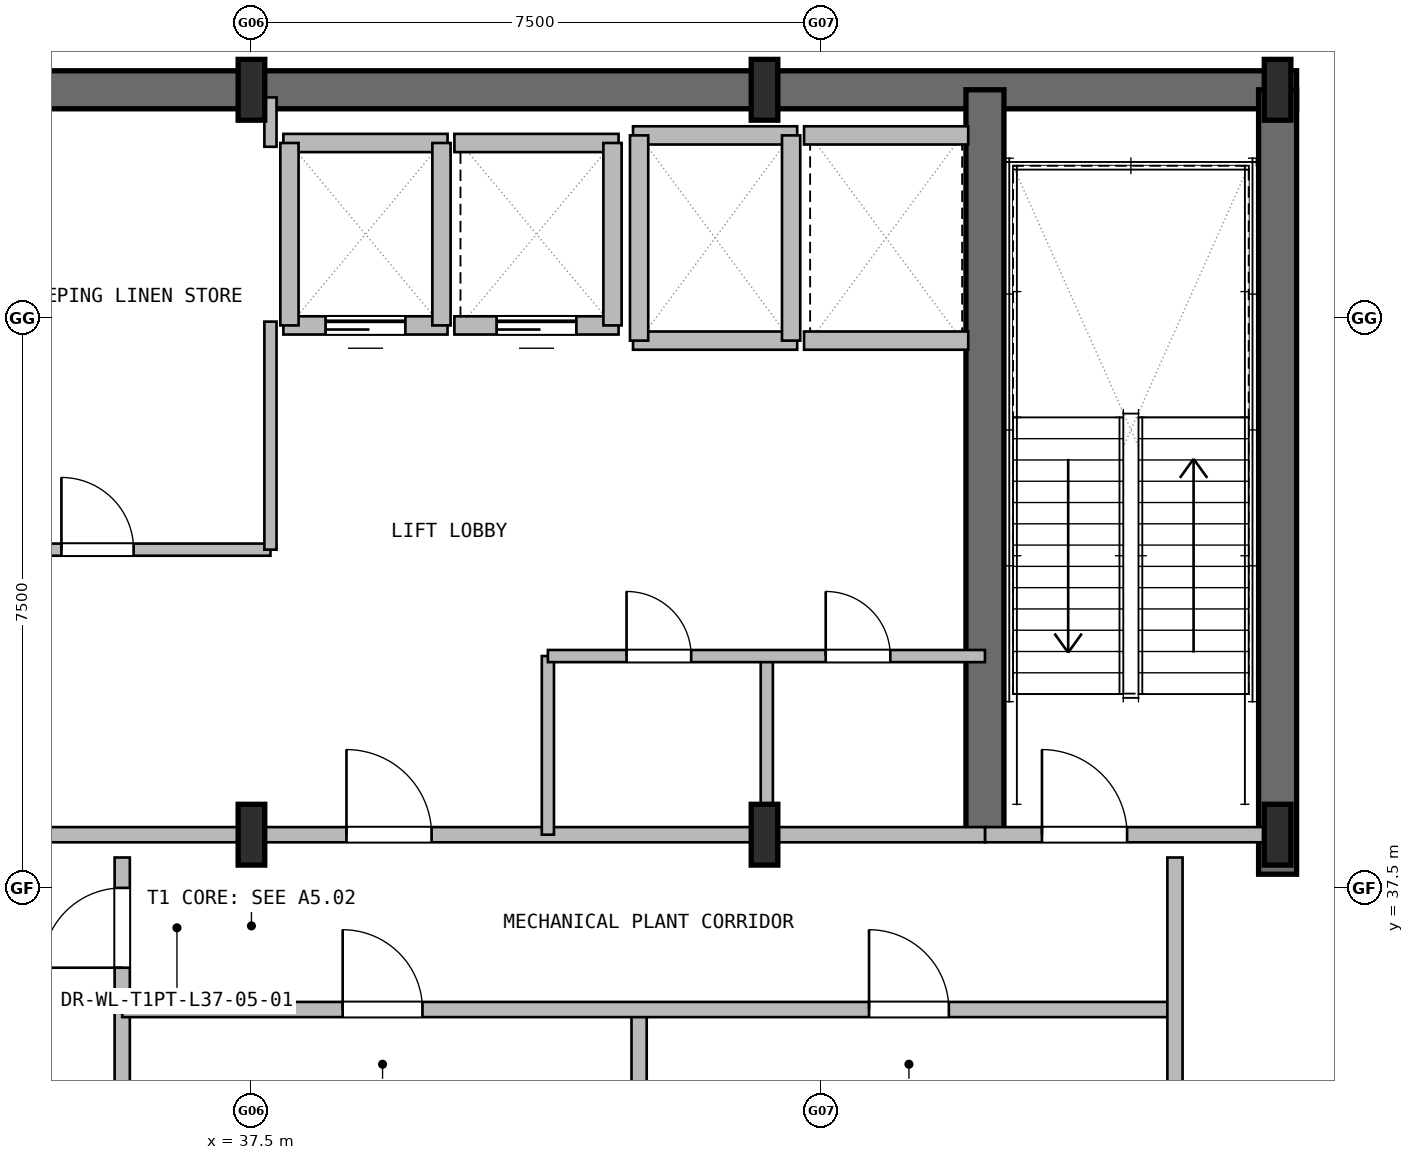
"""IFC4 building model, lengths in metres.
Left out: names, types, materials, properties, quantities, classifications, styles, units other than length and angle.
Written with IfcOpenShell. Run it as: python <this file> out.ifc"""

import sys

from ifc_helpers import new_model, si_unit, direction, frame, frame_2d, origin, origin_2d, place, context, subcontext, project, spatial, rectangle, i_section, extrude, element, fill, save


model = new_model("IFC4")
c1 = context("Model", 3, precision=1e-05, world=origin(), true_north=direction((0.0, 1.0)))
c2 = subcontext(c1, "Body", "Model", "MODEL_VIEW")
j1 = project(units=[si_unit("LENGTHUNIT", "METRE"), si_unit("PLANEANGLEUNIT", "RADIAN")], contexts=[c1])
p1 = place(None, origin())
s1 = spatial("IfcSite", under=j1, at=p1, CompositionType="ELEMENT")
p2 = place(p1, origin())
s2 = spatial("IfcBuilding", under=s1, at=p2, CompositionType="ELEMENT")
p3 = place(p2, frame((0.0, 0.0, 138.0)))
s3 = spatial("IfcBuildingStorey", under=s2, at=p3, CompositionType="ELEMENT", Elevation=138.0)
p4 = place(p3, frame((23.75, 48.0, 0.0), z_axis=(0.0, 0.0, 1.0), x_axis=(1.0, 0.0, 0.0)))
e1 = element("IfcWall", 1, at=p4, inside=s3, PredefinedType="SHEAR", context=c2, shape_type="SweptSolid", body=[
    extrude(rectangle(XDim=27.5, YDim=0.5, at=frame_2d((13.75, 0.0))), origin(), (0.0, 0.0, 1.0), 4.8),
])
p5 = place(p3, frame((51.0, 37.68, 0.0), z_axis=(0.0, 0.0, 1.0), x_axis=(0.0, 1.0, 0.0)))
e2 = element("IfcWall", 2, at=p5, inside=s3, PredefinedType="SHEAR", context=c2, shape_type="SweptSolid", body=[
    extrude(rectangle(XDim=10.32, YDim=0.5, at=frame_2d((5.16, 0.0))), origin(), (0.0, 0.0, 1.0), 4.8),
])
p6 = place(p3, frame((47.15, 38.2, 0.0), z_axis=(0.0, 0.0, 1.0), x_axis=(0.0, 1.0, 0.0)))
e3 = element("IfcWall", 3, at=p6, inside=s3, PredefinedType="SHEAR", context=c2, shape_type="SweptSolid", body=[
    extrude(rectangle(XDim=9.8, YDim=0.5, at=frame_2d((4.9, 0.0))), origin(), (0.0, 0.0, 1.0), 4.8),
])
for number, where, z_axis, x_axis in (
    (4, (37.5, 38.2, 0.0), (0.0, 0.0, 1.0), (1.0, 0.0, 0.0)),
    (5, (37.5, 48.0, 0.0), (0.0, 0.0, 1.0), (1.0, 0.0, 0.0)),
    (6, (44.25, 38.2, 0.0), (0.0, 0.0, 1.0), (1.0, 0.0, 0.0)),
    (7, (44.25, 48.0, 0.0), (0.0, 0.0, 1.0), (1.0, 0.0, 0.0)),
    (8, (51.0, 38.2, 0.0), (0.0, 0.0, 1.0), (1.0, 0.0, 0.0)),
    (9, (51.0, 48.0, 0.0), (0.0, 0.0, 1.0), (1.0, 0.0, 0.0)),
):
    element("IfcColumn", number, at=place(p3, frame(where, z_axis=z_axis, x_axis=x_axis)), inside=s3, PredefinedType="COLUMN", context=c2, shape_type="SweptSolid", body=[
        extrude(i_section(OverallWidth=0.35, OverallDepth=0.8, WebThickness=0.018, FlangeThickness=0.032, at=origin_2d()), origin(), (0.0, 0.0, 1.0), 4.8),
    ])
p7 = place(p3, frame((47.15, 38.2, 0.0), z_axis=(0.0, 0.0, 1.0), x_axis=(1.0, 0.0, 0.0)))
e10 = element("IfcWall", 10, at=p7, inside=s3, PredefinedType="PARTITIONING", context=c2, shape_type="SweptSolid", body=[
    extrude(rectangle(XDim=3.85, YDim=0.2, at=frame_2d((1.925, 0.0))), origin(), (0.0, 0.0, 1.0), 3.88),
])
p8 = place(p7, frame((0.75, 0.0, 0.0)))
e11 = element("IfcOpeningElement", 11, at=p8, cuts=e10, PredefinedType="OPENING", context=c2, shape_type="SweptSolid", body=[
    extrude(rectangle(XDim=1.12, YDim=2.1, at=frame_2d((0.56, 1.05))), frame((0.0, 0.11, 0.0), z_axis=(0.0, -1.0, 0.0), x_axis=(1.0, 0.0, 0.0)), (0.0, 0.0, 1.0), 0.22),
])
p9 = place(p3, frame((30.8, 38.2, 0.0), z_axis=(0.0, 0.0, 1.0), x_axis=(1.0, 0.0, 0.0)))
e12 = element("IfcWall", 12, at=p9, inside=s3, PredefinedType="PARTITIONING", context=c2, shape_type="SweptSolid", body=[
    extrude(rectangle(XDim=16.35, YDim=0.2, at=frame_2d((8.175, 0.0))), origin(), (0.0, 0.0, 1.0), 3.88),
])
p10 = place(p9, frame((2.1, 0.0, 0.0)))
e13 = element("IfcOpeningElement", 13, at=p10, cuts=e12, PredefinedType="OPENING", context=c2, shape_type="SweptSolid", body=[
    extrude(rectangle(XDim=1.12, YDim=2.1, at=frame_2d((0.56, 1.05))), frame((0.0, 0.11, 0.0), z_axis=(0.0, -1.0, 0.0), x_axis=(1.0, 0.0, 0.0)), (0.0, 0.0, 1.0), 0.22),
])
p11 = place(p9, frame((7.95, 0.0, 0.0)))
e14 = element("IfcOpeningElement", 14, at=p11, cuts=e12, PredefinedType="OPENING", context=c2, shape_type="SweptSolid", body=[
    extrude(rectangle(XDim=1.12, YDim=2.1, at=frame_2d((0.56, 1.05))), frame((0.0, 0.11, 0.0), z_axis=(0.0, -1.0, 0.0), x_axis=(1.0, 0.0, 0.0)), (0.0, 0.0, 1.0), 0.22),
])
p12 = place(p3, frame((37.92, 44.9, 0.0), z_axis=(0.0, 0.0, 1.0), x_axis=(1.0, 0.0, 0.0)))
e15 = element("IfcWall", 15, at=p12, inside=s3, PredefinedType="PARTITIONING", context=c2, shape_type="SweptSolid", body=[
    extrude(rectangle(XDim=2.16, YDim=0.24, at=frame_2d((1.08, 0.0))), origin(), (0.0, 0.0, 1.0), 4.53),
])
p13 = place(p12, frame((0.555, 0.0, 0.0)))
e16 = element("IfcOpeningElement", 16, at=p13, cuts=e15, PredefinedType="OPENING", context=c2, shape_type="SweptSolid", body=[
    extrude(rectangle(XDim=1.05, YDim=2.15, at=frame_2d((0.525, 1.075))), frame((0.0, 0.13, 0.0), z_axis=(0.0, -1.0, 0.0), x_axis=(1.0, 0.0, 0.0)), (0.0, 0.0, 1.0), 0.26),
])
p14 = place(p3, frame((37.92, 47.3, 0.0), z_axis=(0.0, 0.0, 1.0), x_axis=(1.0, 0.0, 0.0)))
e17 = element("IfcWall", 17, at=p14, inside=s3, PredefinedType="PARTITIONING", context=c2, shape_type="SweptSolid", body=[
    extrude(rectangle(XDim=2.16, YDim=0.24, at=frame_2d((1.08, 0.0))), origin(), (0.0, 0.0, 1.0), 4.53),
])
for number, where, z_axis, x_axis in (
    (18, (38.0, 44.9, 0.0), (0.0, 0.0, 1.0), (0.0, 1.0, 0.0)),
    (19, (40.0, 44.9, 0.0), (0.0, 0.0, 1.0), (0.0, 1.0, 0.0)),
):
    element("IfcWall", number, at=place(p3, frame(where, z_axis=z_axis, x_axis=x_axis)), inside=s3, PredefinedType="PARTITIONING", context=c2, shape_type="SweptSolid", body=[
        extrude(rectangle(XDim=2.4, YDim=0.24, at=frame_2d((1.2, 0.0))), origin(), (0.0, 0.0, 1.0), 4.53),
    ])
p15 = place(p3, frame((40.17, 44.9, 0.0), z_axis=(0.0, 0.0, 1.0), x_axis=(1.0, 0.0, 0.0)))
e20 = element("IfcWall", 20, at=p15, inside=s3, PredefinedType="PARTITIONING", context=c2, shape_type="SweptSolid", body=[
    extrude(rectangle(XDim=2.16, YDim=0.24, at=frame_2d((1.08, 0.0))), origin(), (0.0, 0.0, 1.0), 4.53),
])
p16 = place(p15, frame((0.555, 0.0, 0.0)))
e21 = element("IfcOpeningElement", 21, at=p16, cuts=e20, PredefinedType="OPENING", context=c2, shape_type="SweptSolid", body=[
    extrude(rectangle(XDim=1.05, YDim=2.15, at=frame_2d((0.525, 1.075))), frame((0.0, 0.13, 0.0), z_axis=(0.0, -1.0, 0.0), x_axis=(1.0, 0.0, 0.0)), (0.0, 0.0, 1.0), 0.26),
])
p17 = place(p3, frame((40.17, 47.3, 0.0), z_axis=(0.0, 0.0, 1.0), x_axis=(1.0, 0.0, 0.0)))
e22 = element("IfcWall", 22, at=p17, inside=s3, PredefinedType="PARTITIONING", context=c2, shape_type="SweptSolid", body=[
    extrude(rectangle(XDim=2.16, YDim=0.24, at=frame_2d((1.08, 0.0))), origin(), (0.0, 0.0, 1.0), 4.53),
])
p18 = place(p3, frame((42.25, 44.9, 0.0), z_axis=(0.0, 0.0, 1.0), x_axis=(0.0, 1.0, 0.0)))
e23 = element("IfcWall", 23, at=p18, inside=s3, PredefinedType="PARTITIONING", context=c2, shape_type="SweptSolid", body=[
    extrude(rectangle(XDim=2.4, YDim=0.24, at=frame_2d((1.2, 0.0))), origin(), (0.0, 0.0, 1.0), 4.53),
])
for number, where, z_axis, x_axis in (
    (24, (42.52, 44.7, 0.0), (0.0, 0.0, 1.0), (1.0, 0.0, 0.0)),
    (25, (42.52, 47.4, 0.0), (0.0, 0.0, 1.0), (1.0, 0.0, 0.0)),
):
    element("IfcWall", number, at=place(p3, frame(where, z_axis=z_axis, x_axis=x_axis)), inside=s3, PredefinedType="PARTITIONING", context=c2, shape_type="SweptSolid", body=[
        extrude(rectangle(XDim=2.16, YDim=0.24, at=frame_2d((1.08, 0.0))), origin(), (0.0, 0.0, 1.0), 4.53),
    ])
for number, where, z_axis, x_axis in (
    (26, (42.6, 44.7, 0.0), (0.0, 0.0, 1.0), (0.0, 1.0, 0.0)),
    (27, (44.6, 44.7, 0.0), (0.0, 0.0, 1.0), (0.0, 1.0, 0.0)),
):
    element("IfcWall", number, at=place(p3, frame(where, z_axis=z_axis, x_axis=x_axis)), inside=s3, PredefinedType="PARTITIONING", context=c2, shape_type="SweptSolid", body=[
        extrude(rectangle(XDim=2.7, YDim=0.24, at=frame_2d((1.35, 0.0))), origin(), (0.0, 0.0, 1.0), 4.53),
    ])
for number, where, z_axis, x_axis in (
    (28, (44.77, 44.7, 0.0), (0.0, 0.0, 1.0), (1.0, 0.0, 0.0)),
    (29, (44.77, 47.4, 0.0), (0.0, 0.0, 1.0), (1.0, 0.0, 0.0)),
):
    element("IfcWall", number, at=place(p3, frame(where, z_axis=z_axis, x_axis=x_axis)), inside=s3, PredefinedType="PARTITIONING", context=c2, shape_type="SweptSolid", body=[
        extrude(rectangle(XDim=2.16, YDim=0.24, at=frame_2d((1.08, 0.0))), origin(), (0.0, 0.0, 1.0), 4.53),
    ])
p19 = place(p3, frame((30.8, 41.95, 0.0), z_axis=(0.0, 0.0, 1.0), x_axis=(1.0, 0.0, 0.0)))
e30 = element("IfcWall", 30, at=p19, inside=s3, PredefinedType="PARTITIONING", context=c2, shape_type="SweptSolid", body=[
    extrude(rectangle(XDim=6.95, YDim=0.16, at=frame_2d((3.475, 0.0))), origin(), (0.0, 0.0, 1.0), 4.53),
])
p20 = place(p19, frame((4.2, 0.0, 0.0)))
e31 = element("IfcOpeningElement", 31, at=p20, cuts=e30, PredefinedType="OPENING", context=c2, shape_type="SweptSolid", body=[
    extrude(rectangle(XDim=0.95, YDim=2.1, at=frame_2d((0.475, 1.05))), frame((0.0, 0.09, 0.0), z_axis=(0.0, -1.0, 0.0), x_axis=(1.0, 0.0, 0.0)), (0.0, 0.0, 1.0), 0.18),
])
p21 = place(p3, frame((37.75, 41.95, 0.0), z_axis=(0.0, 0.0, 1.0), x_axis=(0.0, 1.0, 0.0)))
e32 = element("IfcWall", 32, at=p21, inside=s3, PredefinedType="PARTITIONING", context=c2, shape_type="SweptSolid", body=[
    extrude(rectangle(XDim=3.0, YDim=0.16, at=frame_2d((1.5, 0.0))), origin(), (0.0, 0.0, 1.0), 4.53),
])
p22 = place(p3, frame((37.75, 47.25, 0.0), z_axis=(0.0, 0.0, 1.0), x_axis=(0.0, 1.0, 0.0)))
e33 = element("IfcWall", 33, at=p22, inside=s3, PredefinedType="PARTITIONING", context=c2, shape_type="SweptSolid", body=[
    extrude(rectangle(XDim=0.65, YDim=0.16, at=frame_2d((0.325, 0.0))), origin(), (0.0, 0.0, 1.0), 4.53),
])
for number, where, z_axis, x_axis in (
    (34, (41.4, 38.2, 0.0), (0.0, 0.0, 1.0), (0.0, 1.0, 0.0)),
    (35, (44.28, 38.2, 0.0), (0.0, 0.0, 1.0), (0.0, 1.0, 0.0)),
):
    element("IfcWall", number, at=place(p3, frame(where, z_axis=z_axis, x_axis=x_axis)), inside=s3, PredefinedType="PARTITIONING", context=c2, shape_type="SweptSolid", body=[
        extrude(rectangle(XDim=2.35, YDim=0.16, at=frame_2d((1.175, 0.0))), origin(), (0.0, 0.0, 1.0), 4.53),
    ])
p23 = place(p3, frame((41.4, 40.55, 0.0), z_axis=(0.0, 0.0, 1.0), x_axis=(1.0, 0.0, 0.0)))
e36 = element("IfcWall", 36, at=p23, inside=s3, PredefinedType="PARTITIONING", context=c2, shape_type="SweptSolid", body=[
    extrude(rectangle(XDim=5.75, YDim=0.16, at=frame_2d((2.875, 0.0))), origin(), (0.0, 0.0, 1.0), 4.53),
])
p24 = place(p23, frame((1.035, 0.0, 0.0)))
e37 = element("IfcOpeningElement", 37, at=p24, cuts=e36, PredefinedType="OPENING", context=c2, shape_type="SweptSolid", body=[
    extrude(rectangle(XDim=0.85, YDim=2.05, at=frame_2d((0.425, 1.025))), frame((0.0, 0.09, 0.0), z_axis=(0.0, -1.0, 0.0), x_axis=(1.0, 0.0, 0.0)), (0.0, 0.0, 1.0), 0.18),
])
p25 = place(p23, frame((3.655, 0.0, 0.0)))
e38 = element("IfcOpeningElement", 38, at=p25, cuts=e36, PredefinedType="OPENING", context=c2, shape_type="SweptSolid", body=[
    extrude(rectangle(XDim=0.85, YDim=2.05, at=frame_2d((0.425, 1.025))), frame((0.0, 0.09, 0.0), z_axis=(0.0, -1.0, 0.0), x_axis=(1.0, 0.0, 0.0)), (0.0, 0.0, 1.0), 0.18),
])
p26 = place(p3, frame((35.8, 21.5, 0.0), z_axis=(0.0, 0.0, 1.0), x_axis=(0.0, 1.0, 0.0)))
e39 = element("IfcWall", 39, at=p26, inside=s3, PredefinedType="PARTITIONING", context=c2, shape_type="SweptSolid", body=[
    extrude(rectangle(XDim=16.4, YDim=0.2, at=frame_2d((8.2, 0.0))), origin(), (0.0, 0.0, 1.0), 4.53),
])
p27 = place(p26, frame((14.95, 0.0, 0.0)))
e40 = element("IfcOpeningElement", 40, at=p27, cuts=e39, PredefinedType="OPENING", context=c2, shape_type="SweptSolid", body=[
    extrude(rectangle(XDim=1.05, YDim=2.1, at=frame_2d((0.525, 1.05))), frame((0.0, 0.11, 0.0), z_axis=(0.0, -1.0, 0.0), x_axis=(1.0, 0.0, 0.0)), (0.0, 0.0, 1.0), 0.22),
])
p28 = place(p3, frame((42.6, 21.5, 0.0), z_axis=(0.0, 0.0, 1.0), x_axis=(0.0, 1.0, 0.0)))
e41 = element("IfcWall", 41, at=p28, inside=s3, PredefinedType="PARTITIONING", context=c2, shape_type="SweptSolid", body=[
    extrude(rectangle(XDim=14.4, YDim=0.2, at=frame_2d((7.2, 0.0))), origin(), (0.0, 0.0, 1.0), 4.53),
])
p29 = place(p3, frame((35.8, 35.9, 0.0), z_axis=(0.0, 0.0, 1.0), x_axis=(1.0, 0.0, 0.0)))
e42 = element("IfcWall", 42, at=p29, inside=s3, PredefinedType="PARTITIONING", context=c2, shape_type="SweptSolid", body=[
    extrude(rectangle(XDim=13.85, YDim=0.2, at=frame_2d((6.925, 0.0))), origin(), (0.0, 0.0, 1.0), 4.53),
])
p30 = place(p29, frame((2.9, 0.0, 0.0)))
e43 = element("IfcOpeningElement", 43, at=p30, cuts=e42, PredefinedType="OPENING", context=c2, shape_type="SweptSolid", body=[
    extrude(rectangle(XDim=1.05, YDim=2.1, at=frame_2d((0.525, 1.05))), frame((0.0, 0.11, 0.0), z_axis=(0.0, -1.0, 0.0), x_axis=(1.0, 0.0, 0.0)), (0.0, 0.0, 1.0), 0.22),
])
p31 = place(p29, frame((9.825, 0.0, 0.0)))
e44 = element("IfcOpeningElement", 44, at=p31, cuts=e42, PredefinedType="OPENING", context=c2, shape_type="SweptSolid", body=[
    extrude(rectangle(XDim=1.05, YDim=2.1, at=frame_2d((0.525, 1.05))), frame((0.0, 0.11, 0.0), z_axis=(0.0, -1.0, 0.0), x_axis=(1.0, 0.0, 0.0)), (0.0, 0.0, 1.0), 0.22),
])
p32 = place(p3, frame((49.65, 21.5, 0.0), z_axis=(0.0, 0.0, 1.0), x_axis=(0.0, 1.0, 0.0)))
e45 = element("IfcWall", 45, at=p32, inside=s3, PredefinedType="PARTITIONING", context=c2, shape_type="SweptSolid", body=[
    extrude(rectangle(XDim=16.4, YDim=0.2, at=frame_2d((8.2, 0.0))), origin(), (0.0, 0.0, 1.0), 4.53),
])
p33 = place(p8, origin())
e46 = element("IfcDoor", 46, at=p33, inside=s3, OperationType="SINGLE_SWING_RIGHT", PredefinedType="DOOR", context=c2, shape_type="SweptSolid", body=[
    extrude(rectangle(XDim=1.12, YDim=2.1, at=frame_2d((0.56, 1.05))), frame((0.0, 0.025, 0.0), z_axis=(0.0, -1.0, 0.0), x_axis=(1.0, 0.0, 0.0)), (0.0, 0.0, 1.0), 0.05),
])
fill(e11, e46)
p34 = place(p11, origin())
e47 = element("IfcDoor", 47, at=p34, inside=s3, OperationType="SINGLE_SWING_RIGHT", PredefinedType="DOOR", context=c2, shape_type="SweptSolid", body=[
    extrude(rectangle(XDim=1.12, YDim=2.1, at=frame_2d((0.56, 1.05))), frame((0.0, 0.025, 0.0), z_axis=(0.0, -1.0, 0.0), x_axis=(1.0, 0.0, 0.0)), (0.0, 0.0, 1.0), 0.05),
])
fill(e14, e47)
p35 = place(p13, origin())
e48 = element("IfcDoor", 48, at=p35, inside=s3, OperationType="SLIDING_TO_LEFT", PredefinedType="DOOR", context=c2, shape_type="SweptSolid", body=[
    extrude(rectangle(XDim=1.05, YDim=2.15, at=frame_2d((0.525, 1.075))), frame((0.0, 0.025, 0.0), z_axis=(0.0, -1.0, 0.0), x_axis=(1.0, 0.0, 0.0)), (0.0, 0.0, 1.0), 0.05),
])
fill(e16, e48)
p36 = place(p16, origin())
e49 = element("IfcDoor", 49, at=p36, inside=s3, OperationType="SLIDING_TO_LEFT", PredefinedType="DOOR", context=c2, shape_type="SweptSolid", body=[
    extrude(rectangle(XDim=1.05, YDim=2.15, at=frame_2d((0.525, 1.075))), frame((0.0, 0.025, 0.0), z_axis=(0.0, -1.0, 0.0), x_axis=(1.0, 0.0, 0.0)), (0.0, 0.0, 1.0), 0.05),
])
fill(e21, e49)
p37 = place(p20, origin())
e50 = element("IfcDoor", 50, at=p37, inside=s3, OperationType="SINGLE_SWING_LEFT", PredefinedType="DOOR", context=c2, shape_type="SweptSolid", body=[
    extrude(rectangle(XDim=0.95, YDim=2.1, at=frame_2d((0.475, 1.05))), frame((0.0, 0.025, 0.0), z_axis=(0.0, -1.0, 0.0), x_axis=(1.0, 0.0, 0.0)), (0.0, 0.0, 1.0), 0.05),
])
fill(e31, e50)
p38 = place(p24, origin())
e51 = element("IfcDoor", 51, at=p38, inside=s3, OperationType="SINGLE_SWING_RIGHT", PredefinedType="DOOR", context=c2, shape_type="SweptSolid", body=[
    extrude(rectangle(XDim=0.85, YDim=2.05, at=frame_2d((0.425, 1.025))), frame((0.0, 0.025, 0.0), z_axis=(0.0, -1.0, 0.0), x_axis=(1.0, 0.0, 0.0)), (0.0, 0.0, 1.0), 0.05),
])
fill(e37, e51)
p39 = place(p25, origin())
e52 = element("IfcDoor", 52, at=p39, inside=s3, OperationType="SINGLE_SWING_LEFT", PredefinedType="DOOR", context=c2, shape_type="SweptSolid", body=[
    extrude(rectangle(XDim=0.85, YDim=2.05, at=frame_2d((0.425, 1.025))), frame((0.0, 0.025, 0.0), z_axis=(0.0, -1.0, 0.0), x_axis=(1.0, 0.0, 0.0)), (0.0, 0.0, 1.0), 0.05),
])
fill(e38, e52)
p40 = place(p27, origin())
e53 = element("IfcDoor", 53, at=p40, inside=s3, OperationType="SINGLE_SWING_LEFT", PredefinedType="DOOR", context=c2, shape_type="SweptSolid", body=[
    extrude(rectangle(XDim=1.05, YDim=2.1, at=frame_2d((0.525, 1.05))), frame((0.0, 0.025, 0.0), z_axis=(0.0, -1.0, 0.0), x_axis=(1.0, 0.0, 0.0)), (0.0, 0.0, 1.0), 0.05),
])
fill(e40, e53)
p41 = place(p30, origin())
e54 = element("IfcDoor", 54, at=p41, inside=s3, OperationType="SINGLE_SWING_RIGHT", PredefinedType="DOOR", context=c2, shape_type="SweptSolid", body=[
    extrude(rectangle(XDim=1.05, YDim=2.1, at=frame_2d((0.525, 1.05))), frame((0.0, 0.025, 0.0), z_axis=(0.0, -1.0, 0.0), x_axis=(1.0, 0.0, 0.0)), (0.0, 0.0, 1.0), 0.05),
])
fill(e43, e54)
p42 = place(p31, origin())
e55 = element("IfcDoor", 55, at=p42, inside=s3, OperationType="SINGLE_SWING_LEFT", PredefinedType="DOOR", context=c2, shape_type="SweptSolid", body=[
    extrude(rectangle(XDim=1.05, YDim=2.1, at=frame_2d((0.525, 1.05))), frame((0.0, 0.025, 0.0), z_axis=(0.0, -1.0, 0.0), x_axis=(1.0, 0.0, 0.0)), (0.0, 0.0, 1.0), 0.05),
])
fill(e44, e55)
save(model, sys.argv[1])
